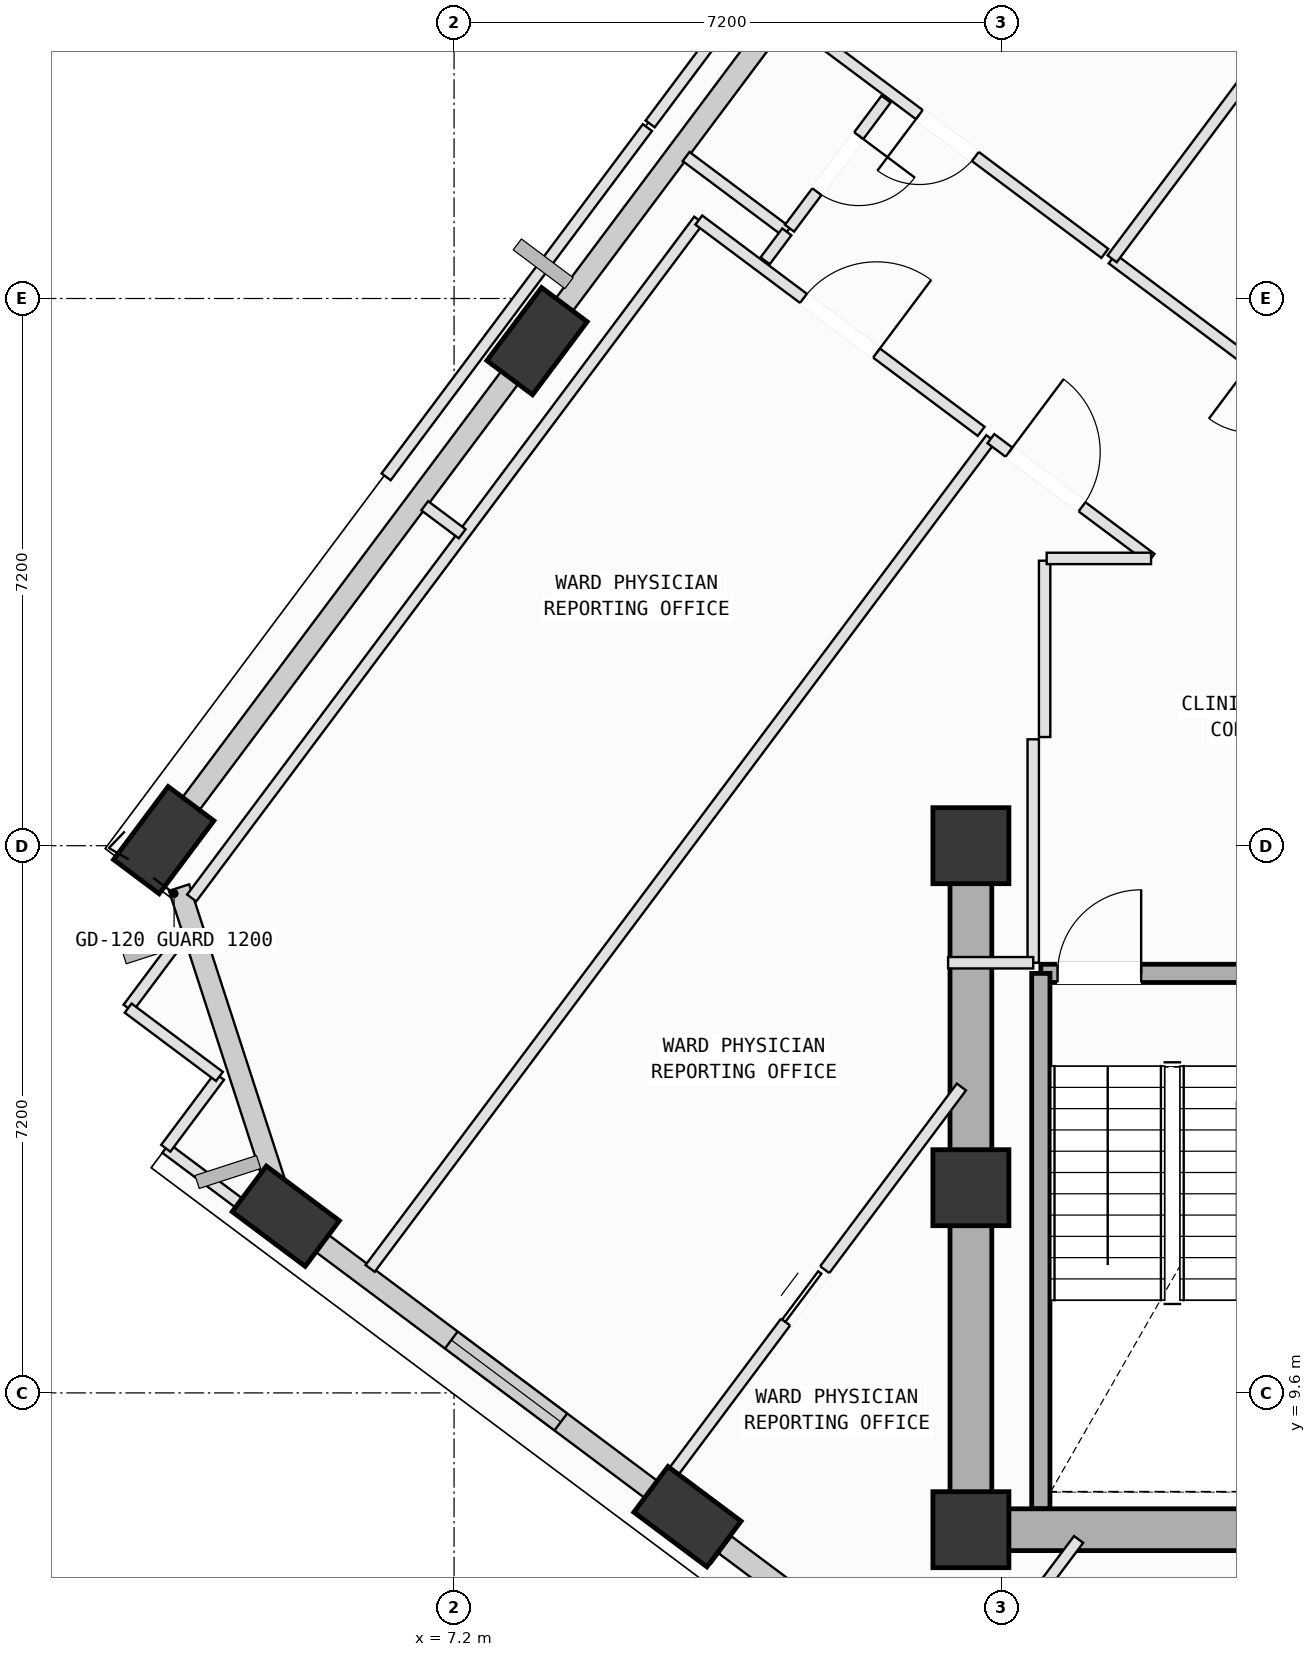
"""IFC4 building model, lengths in metres.
Left out: names, types, materials, properties, quantities, classifications, styles, units other than length and angle.
Written with IfcOpenShell. Run it as: python <this file> out.ifc"""

import sys

from ifc_helpers import new_model, si_unit, direction, frame, frame_2d, origin, origin_2d, place, context, subcontext, project, spatial, rectangle, extrude, element, fill, save


model = new_model("IFC4")
c1 = context("Model", 3, precision=1e-05, world=origin(), true_north=direction((0.0, 1.0)))
c2 = subcontext(c1, "Body", "Model", "MODEL_VIEW")
j1 = project(units=[si_unit("LENGTHUNIT", "METRE"), si_unit("PLANEANGLEUNIT", "RADIAN")], contexts=[c1])
p1 = place(None, origin())
s1 = spatial("IfcSite", under=j1, at=p1, CompositionType="ELEMENT")
p2 = place(p1, origin())
s2 = spatial("IfcBuilding", under=s1, at=p2, CompositionType="ELEMENT")
p3 = place(p2, frame((0.0, 0.0, 251.2)))
s3 = spatial("IfcBuildingStorey", under=s2, at=p3, CompositionType="ELEMENT", Elevation=251.2)
for number, where, z_axis, x_axis in (
    (1, (14.0, 7.8, 0.0), (0.0, 0.0, 1.0), (1.0, 0.0, 0.0)),
    (2, (14.0, 12.3, 0.0), (0.0, 0.0, 1.0), (1.0, 0.0, 0.0)),
    (3, (14.0, 16.8, 0.0), (0.0, 0.0, 1.0), (1.0, 0.0, 0.0)),
):
    element("IfcColumn", number, at=place(p3, frame(where, z_axis=z_axis, x_axis=x_axis)), inside=s3, PredefinedType="COLUMN", context=c2, shape_type="SweptSolid", body=[
        extrude(rectangle(XDim=1.0, YDim=1.0, at=origin_2d()), origin(), (0.0, 0.0, 1.0), 4.0),
    ])
p4 = place(p3, frame((8.292, 23.439, 0.002), z_axis=(0.006440188343, -0.104318899858, 0.994523047046), x_axis=(0.548815872699, 0.831743378243, 0.083690445228)))
e4 = element("IfcColumn", 4, at=p4, inside=s3, PredefinedType="COLUMN", context=c2, shape_type="SweptSolid", body=[
    extrude(rectangle(XDim=1.2, YDim=0.75, at=origin_2d()), origin(), (0.0, 0.0, 1.0), 4.018),
])
p5 = place(p3, frame((3.38, 16.873, 0.002), z_axis=(0.033624737354, -0.123957139866, 0.991717704044), x_axis=(0.370235702407, 0.92322736919, 0.102843324731)))
e5 = element("IfcColumn", 5, at=p5, inside=s3, PredefinedType="COLUMN", context=c2, shape_type="SweptSolid", body=[
    extrude(rectangle(XDim=1.2, YDim=0.75, at=origin_2d()), origin(), (0.0, 0.0, 1.0), 4.03),
])
p6 = place(p3, frame((4.986, 11.925, 0.002), z_axis=(0.053856553718, -0.117163751282, 0.991651212376), x_axis=(-0.975646086915, 0.205300135249, 0.077243559951)))
e6 = element("IfcColumn", 6, at=p6, inside=s3, PredefinedType="COLUMN", context=c2, shape_type="SweptSolid", body=[
    extrude(rectangle(XDim=1.2, YDim=0.75, at=origin_2d()), origin(), (0.0, 0.0, 1.0), 4.03),
])
p7 = place(p3, frame((10.271, 7.971, 0.002), z_axis=(0.070003274171, -0.09548106893, 0.992966720027), x_axis=(-0.997462411054, 0.006244621078, 0.07092068275)))
e7 = element("IfcColumn", 7, at=p7, inside=s3, PredefinedType="COLUMN", context=c2, shape_type="SweptSolid", body=[
    extrude(rectangle(XDim=1.2, YDim=0.75, at=origin_2d()), origin(), (0.0, 0.0, 1.0), 4.025),
])
p8 = place(p3, frame((8.419, 23.61, 0.0), z_axis=(0.0, 0.0, 1.0), x_axis=(0.599043256436, 0.800716664569, 0.0)))
e8 = element("IfcWall", 8, at=p8, inside=s3, PredefinedType="SOLIDWALL", context=c2, shape_type="SweptSolid", body=[
    extrude(rectangle(XDim=7.434, YDim=0.28, at=frame_2d((3.717, 0.0))), origin(), (0.0, 0.0, 1.0), 3.265),
])
p9 = place(p3, frame((3.489, 17.019, 0.0), z_axis=(0.0, 0.0, 1.0), x_axis=(0.59901836421, 0.800735286683, 0.0)))
e9 = element("IfcWall", 9, at=p9, inside=s3, PredefinedType="SOLIDWALL", context=c2, shape_type="SweptSolid", body=[
    extrude(rectangle(XDim=7.485, YDim=0.28, at=frame_2d((3.742, 0.0))), origin(), (0.0, 0.0, 1.0), 3.265),
])
p10 = place(p3, frame((4.943, 12.056, 0.0), z_axis=(0.0, 0.0, 1.0), x_axis=(-0.30872411245, 0.951151629548, 0.0)))
e10 = element("IfcWall", 10, at=p10, inside=s3, PredefinedType="SOLIDWALL", context=c2, shape_type="SweptSolid", body=[
    extrude(rectangle(XDim=4.408, YDim=0.28, at=frame_2d((2.204, 0.0))), origin(), (0.0, 0.0, 1.0), 3.265),
])
p11 = place(p3, frame((10.14, 8.069, 0.0), z_axis=(0.0, 0.0, 1.0), x_axis=(-0.800727991846, 0.599028115429, 0.0)))
e11 = element("IfcWall", 11, at=p11, inside=s3, PredefinedType="SOLIDWALL", context=c2, shape_type="SweptSolid", body=[
    extrude(rectangle(XDim=5.831, YDim=0.28, at=frame_2d((2.915, 0.0))), origin(), (0.0, 0.0, 1.0), 3.265),
])
p12 = place(p11, frame((1.917, 0.0, 0.75)))
e12 = element("IfcOpeningElement", 12, at=p12, cuts=e11, PredefinedType="OPENING", context=c2, shape_type="SweptSolid", body=[
    extrude(rectangle(XDim=1.8, YDim=2.05, at=frame_2d((0.9, 1.025))), frame((0.0, 0.15, 0.0), z_axis=(0.0, -1.0, 0.0), x_axis=(1.0, 0.0, 0.0)), (0.0, 0.0, 1.0), 0.3),
])
p13 = place(p3, frame((15.46, 4.09, 0.0), z_axis=(0.0, 0.0, 1.0), x_axis=(-0.800744184448, 0.599006469976, 0.0)))
e13 = element("IfcWall", 13, at=p13, inside=s3, PredefinedType="SOLIDWALL", context=c2, shape_type="SweptSolid", body=[
    extrude(rectangle(XDim=5.861, YDim=0.28, at=frame_2d((2.93, 0.0))), origin(), (0.0, 0.0, 1.0), 3.245),
])
p14 = place(p13, frame((3.604, 0.0, 0.75)))
e14 = element("IfcOpeningElement", 14, at=p14, cuts=e13, PredefinedType="OPENING", context=c2, shape_type="SweptSolid", body=[
    extrude(rectangle(XDim=1.2, YDim=1.75, at=frame_2d((0.6, 0.875))), frame((0.0, 0.15, 0.0), z_axis=(0.0, -1.0, 0.0), x_axis=(1.0, 0.0, 0.0)), (0.0, 0.0, 1.0), 0.3),
])
p15 = place(p3, frame((14.92, 15.12, 0.0), z_axis=(0.0, 0.0, 1.0), x_axis=(1.0, 0.0, 0.0)))
e15 = element("IfcWall", 15, at=p15, inside=s3, PredefinedType="SOLIDWALL", context=c2, shape_type="SweptSolid", body=[
    extrude(rectangle(XDim=3.46, YDim=0.24, at=frame_2d((1.73, 0.0))), origin(), (0.0, 0.0, 1.0), 3.78),
])
p16 = place(p15, frame((0.22, 0.0, 0.0)))
e16 = element("IfcOpeningElement", 16, at=p16, cuts=e15, PredefinedType="OPENING", context=c2, shape_type="SweptSolid", body=[
    extrude(rectangle(XDim=1.1, YDim=2.15, at=frame_2d((0.55, 1.075))), frame((0.0, 0.13, 0.0), z_axis=(0.0, -1.0, 0.0), x_axis=(1.0, 0.0, 0.0)), (0.0, 0.0, 1.0), 0.26),
])
p17 = place(p3, frame((14.92, 8.075, 0.0), z_axis=(0.0, 0.0, 1.0), x_axis=(0.0, 1.0, 0.0)))
e17 = element("IfcWall", 17, at=p17, inside=s3, PredefinedType="SOLIDWALL", context=c2, shape_type="SweptSolid", body=[
    extrude(rectangle(XDim=7.045, YDim=0.24, at=frame_2d((3.522, 0.0))), origin(), (0.0, 0.0, 1.0), 3.78),
])
p18 = place(p3, frame((14.0, 7.8, 0.0), z_axis=(0.0, 0.0, 1.0), x_axis=(1.0, 0.0, 0.0)))
e18 = element("IfcWall", 18, at=p18, inside=s3, PredefinedType="SHEAR", context=c2, shape_type="SweptSolid", body=[
    extrude(rectangle(XDim=10.8, YDim=0.55, at=frame_2d((5.4, 0.0))), origin(), (0.0, 0.0, 1.0), 3.78),
])
p19 = place(p3, frame((14.0, 16.8, 0.0), z_axis=(0.0, 0.0, 1.0), x_axis=(0.0, -1.0, 0.0)))
e19 = element("IfcWall", 19, at=p19, inside=s3, PredefinedType="SHEAR", context=c2, shape_type="SweptSolid", body=[
    extrude(rectangle(XDim=9.0, YDim=0.55, at=frame_2d((4.5, 0.0))), origin(), (0.0, 0.0, 1.0), 3.78),
])
p20 = place(p3, frame((13.782, 5.488, 0.0), z_axis=(0.0, 0.0, 1.0), x_axis=(0.599283876388, 0.800536592231, 0.0)))
e20 = element("IfcWall", 20, at=p20, inside=s3, PredefinedType="PARTITIONING", context=c2, shape_type="SweptSolid", body=[
    extrude(rectangle(XDim=2.728, YDim=0.15, at=frame_2d((1.364, 0.0))), origin(), (0.0, 0.0, 1.0), 3.78),
])
p21 = place(p20, frame((0.302, 0.0, 0.0)))
e21 = element("IfcOpeningElement", 21, at=p21, cuts=e20, PredefinedType="OPENING", context=c2, shape_type="SweptSolid", body=[
    extrude(rectangle(XDim=0.86, YDim=2.06, at=frame_2d((0.43, 1.03))), frame((0.0, 0.085, 0.0), z_axis=(0.0, -1.0, 0.0), x_axis=(1.0, 0.0, 0.0)), (0.0, 0.0, 1.0), 0.17),
])
p22 = place(p3, frame((10.629, 7.416, 0.0), z_axis=(0.0, 0.0, 1.0), x_axis=(-0.8007477401, 0.599001716796, 0.0)))
e22 = element("IfcWall", 22, at=p22, inside=s3, PredefinedType="PARTITIONING", context=c2, shape_type="SweptSolid", body=[
    extrude(rectangle(XDim=0.783, YDim=0.15, at=frame_2d((0.392, 0.0))), origin(), (0.0, 0.0, 1.0), 3.245),
])
p23 = place(p3, frame((9.939, 8.363, 0.0), z_axis=(0.0, 0.0, 1.0), x_axis=(0.598983005593, 0.80076173673, 0.0)))
e23 = element("IfcWall", 23, at=p23, inside=s3, PredefinedType="PARTITIONING", context=c2, shape_type="SweptSolid", body=[
    extrude(rectangle(XDim=6.571, YDim=0.15, at=frame_2d((3.286, 0.0))), origin(), (0.0, 0.0, 1.0), 3.78),
])
p24 = place(p23, frame((2.709, 0.0, 0.0)))
e24 = element("IfcOpeningElement", 24, at=p24, cuts=e23, PredefinedType="OPENING", context=c2, shape_type="SweptSolid", body=[
    extrude(rectangle(XDim=0.86, YDim=2.06, at=frame_2d((0.43, 1.03))), frame((0.0, 0.085, 0.0), z_axis=(0.0, -1.0, 0.0), x_axis=(1.0, 0.0, 0.0)), (0.0, 0.0, 1.0), 0.17),
])
p25 = place(p3, frame((14.97, 20.55, 0.0), z_axis=(0.0, 0.0, 1.0), x_axis=(0.0, -1.0, 0.0)))
e25 = element("IfcWall", 25, at=p25, inside=s3, PredefinedType="PARTITIONING", context=c2, shape_type="SweptSolid", body=[
    extrude(rectangle(XDim=2.32, YDim=0.15, at=frame_2d((1.16, 0.0))), origin(), (0.0, 0.0, 1.0), 3.78),
])
p26 = place(p3, frame((14.82, 18.2, 0.0), z_axis=(0.0, 0.0, 1.0), x_axis=(0.0, -1.0, 0.0)))
e26 = element("IfcWall", 26, at=p26, inside=s3, PredefinedType="PARTITIONING", context=c2, shape_type="SweptSolid", body=[
    extrude(rectangle(XDim=2.94, YDim=0.15, at=frame_2d((1.47, 0.0))), origin(), (0.0, 0.0, 1.0), 3.78),
])
p27 = place(p3, frame((14.82, 15.26, 0.0), z_axis=(0.0, 0.0, 1.0), x_axis=(-1.0, 0.0, 0.0)))
e27 = element("IfcWall", 27, at=p27, inside=s3, PredefinedType="PARTITIONING", context=c2, shape_type="SweptSolid", body=[
    extrude(rectangle(XDim=1.12, YDim=0.15, at=frame_2d((0.56, 0.0))), origin(), (0.0, 0.0, 1.0), 3.78),
])
p28 = place(p3, frame((6.096, 11.238, 0.0), z_axis=(0.0, 0.0, 1.0), x_axis=(0.598991058124, 0.80075571324, 0.0)))
e28 = element("IfcWall", 28, at=p28, inside=s3, PredefinedType="PARTITIONING", context=c2, shape_type="SweptSolid", body=[
    extrude(rectangle(XDim=13.635, YDim=0.15, at=frame_2d((6.817, 0.0))), origin(), (0.0, 0.0, 1.0), 3.78),
])
p29 = place(p3, frame((14.263, 22.156, 0.0), z_axis=(0.0, 0.0, 1.0), x_axis=(0.800812047069, -0.598915741377, 0.0)))
e29 = element("IfcWall", 29, at=p29, inside=s3, PredefinedType="PARTITIONING", context=c2, shape_type="SweptSolid", body=[
    extrude(rectangle(XDim=2.631, YDim=0.15, at=frame_2d((1.316, 0.0))), origin(), (0.0, 0.0, 1.0), 3.78),
])
p30 = place(p29, frame((0.297, 0.0, 0.0)))
e30 = element("IfcOpeningElement", 30, at=p30, cuts=e29, PredefinedType="OPENING", context=c2, shape_type="SweptSolid", body=[
    extrude(rectangle(XDim=1.2, YDim=2.15, at=frame_2d((0.6, 1.075))), frame((0.0, 0.085, 0.0), z_axis=(0.0, -1.0, 0.0), x_axis=(1.0, 0.0, 0.0)), (0.0, 0.0, 1.0), 0.17),
])
p31 = place(p3, frame((16.37, 20.58, 0.0), z_axis=(0.0, 0.0, 1.0), x_axis=(-1.0, 0.0, 0.0)))
e31 = element("IfcWall", 31, at=p31, inside=s3, PredefinedType="PARTITIONING", context=c2, shape_type="SweptSolid", body=[
    extrude(rectangle(XDim=1.373, YDim=0.15, at=frame_2d((0.687, 0.0))), origin(), (0.0, 0.0, 1.0), 3.78),
])
p32 = place(p3, frame((2.912, 14.663, 0.0), z_axis=(0.0, 0.0, 1.0), x_axis=(0.598958853105, 0.800779802622, 0.0)))
e32 = element("IfcWall", 32, at=p32, inside=s3, PredefinedType="PARTITIONING", context=c2, shape_type="SweptSolid", body=[
    extrude(rectangle(XDim=1.239, YDim=0.15, at=frame_2d((0.619, 0.0))), origin(), (0.0, 0.0, 1.0), 3.78),
])
p33 = place(p3, frame((3.748, 16.112, 0.0), z_axis=(0.0, 0.0, 1.0), x_axis=(0.598961482062, 0.800777836235, 0.0)))
e33 = element("IfcWall", 33, at=p33, inside=s3, PredefinedType="PARTITIONING", context=c2, shape_type="SweptSolid", body=[
    extrude(rectangle(XDim=11.139, YDim=0.15, at=frame_2d((5.57, 0.0))), origin(), (0.0, 0.0, 1.0), 3.265),
])
p34 = place(p3, frame((10.42, 25.032, 0.0), z_axis=(0.0, 0.0, 1.0), x_axis=(0.800649857495, -0.599132544345, 0.0)))
e34 = element("IfcWall", 34, at=p34, inside=s3, PredefinedType="PARTITIONING", context=c2, shape_type="SweptSolid", body=[
    extrude(rectangle(XDim=4.64, YDim=0.15, at=frame_2d((2.32, 0.0))), origin(), (0.0, 0.0, 1.0), 3.78),
])
p35 = place(p34, frame((1.72, 0.0, 0.0)))
e35 = element("IfcOpeningElement", 35, at=p35, cuts=e34, PredefinedType="OPENING", context=c2, shape_type="SweptSolid", body=[
    extrude(rectangle(XDim=1.2, YDim=2.15, at=frame_2d((0.6, 1.075))), frame((0.0, 0.085, 0.0), z_axis=(0.0, -1.0, 0.0), x_axis=(1.0, 0.0, 0.0)), (0.0, 0.0, 1.0), 0.17),
])
p36 = place(p3, frame((5.333, 11.378, 0.0), z_axis=(0.0, 0.0, 1.0), x_axis=(-0.800669347781, 0.599106497648, 0.0)))
e36 = element("IfcWall", 36, at=p36, inside=s3, PredefinedType="PARTITIONING", context=c2, shape_type="SweptSolid", body=[
    extrude(rectangle(XDim=2.406, YDim=0.15, at=frame_2d((1.203, 0.0))), origin(), (0.0, 0.0, 1.0), 3.265),
])
p37 = place(p3, frame((3.407, 12.819, 0.0), z_axis=(0.0, 0.0, 1.0), x_axis=(0.598608136415, 0.801042008273, 0.0)))
e37 = element("IfcWall", 37, at=p37, inside=s3, PredefinedType="PARTITIONING", context=c2, shape_type="SweptSolid", body=[
    extrude(rectangle(XDim=1.179, YDim=0.15, at=frame_2d((0.59, 0.0))), origin(), (0.0, 0.0, 1.0), 3.78),
])
p38 = place(p3, frame((4.113, 13.764, 0.0), z_axis=(0.0, 0.0, 1.0), x_axis=(-0.800487936805, 0.599348865878, 0.0)))
e38 = element("IfcWall", 38, at=p38, inside=s3, PredefinedType="PARTITIONING", context=c2, shape_type="SweptSolid", body=[
    extrude(rectangle(XDim=1.5, YDim=0.15, at=frame_2d((0.75, 0.0))), origin(), (0.0, 0.0, 1.0), 3.78),
])
p39 = place(p3, frame((20.246, 21.24, 0.0), z_axis=(0.0, 0.0, 1.0), x_axis=(-0.800801245032, 0.598930184542, 0.0)))
e39 = element("IfcWall", 39, at=p39, inside=s3, PredefinedType="PARTITIONING", context=c2, shape_type="SweptSolid", body=[
    extrude(rectangle(XDim=5.48, YDim=0.15, at=frame_2d((2.74, 0.0))), origin(), (0.0, 0.0, 1.0), 3.415),
])
p40 = place(p39, frame((2.28, 0.0, 0.0)))
e40 = element("IfcOpeningElement", 40, at=p40, cuts=e39, PredefinedType="OPENING", context=c2, shape_type="SweptSolid", body=[
    extrude(rectangle(XDim=0.92, YDim=2.1, at=frame_2d((0.46, 1.05))), frame((0.0, 0.085, 0.0), z_axis=(0.0, -1.0, 0.0), x_axis=(1.0, 0.0, 0.0)), (0.0, 0.0, 1.0), 0.17),
])
p41 = place(p3, frame((15.858, 24.522, 0.0), z_axis=(0.0, 0.0, 1.0), x_axis=(0.599126091741, 0.800654685989, 0.0)))
e41 = element("IfcWall", 41, at=p41, inside=s3, PredefinedType="PARTITIONING", context=c2, shape_type="SweptSolid", body=[
    extrude(rectangle(XDim=4.069, YDim=0.15, at=frame_2d((2.035, 0.0))), origin(), (0.0, 0.0, 1.0), 3.78),
])
p42 = place(p3, frame((15.762, 24.594, 0.0), z_axis=(0.0, 0.0, 1.0), x_axis=(-0.800735316179, 0.599018324781, 0.0)))
e42 = element("IfcWall", 42, at=p42, inside=s3, PredefinedType="PARTITIONING", context=c2, shape_type="SweptSolid", body=[
    extrude(rectangle(XDim=5.175, YDim=0.15, at=frame_2d((2.588, 0.0))), origin(), (0.0, 0.0, 1.0), 3.78),
])
p43 = place(p42, frame((2.128, 0.0, 0.0)))
e43 = element("IfcOpeningElement", 43, at=p43, cuts=e42, PredefinedType="OPENING", context=c2, shape_type="SweptSolid", body=[
    extrude(rectangle(XDim=0.92, YDim=2.1, at=frame_2d((0.46, 1.05))), frame((0.0, 0.085, 0.0), z_axis=(0.0, -1.0, 0.0), x_axis=(1.0, 0.0, 0.0)), (0.0, 0.0, 1.0), 0.17),
])
p44 = place(p3, frame((7.307, 20.904, 0.0), z_axis=(0.0, 0.0, 1.0), x_axis=(-0.800618180237, 0.599174873867, 0.0)))
e44 = element("IfcWall", 44, at=p44, inside=s3, PredefinedType="PARTITIONING", context=c2, shape_type="SweptSolid", body=[
    extrude(rectangle(XDim=0.616, YDim=0.15, at=frame_2d((0.308, 0.0))), origin(), (0.0, 0.0, 1.0), 3.78),
])
p45 = place(p3, frame((6.306, 21.653, 0.0), z_axis=(0.0, 0.0, 1.0), x_axis=(0.598999072207, 0.800749718386, 0.0)))
e45 = element("IfcWall", 45, at=p45, inside=s3, PredefinedType="PARTITIONING", context=c2, shape_type="SweptSolid", body=[
    extrude(rectangle(XDim=5.74, YDim=0.15, at=frame_2d((2.87, 0.0))), origin(), (0.0, 0.0, 1.0), 3.78),
])
p46 = place(p3, frame((10.253, 25.868, 0.0), z_axis=(0.0, 0.0, 1.0), x_axis=(0.800796106591, -0.598937054847, 0.0)))
e46 = element("IfcWall", 46, at=p46, inside=s3, PredefinedType="PARTITIONING", context=c2, shape_type="SweptSolid", body=[
    extrude(rectangle(XDim=1.655, YDim=0.15, at=frame_2d((0.827, 0.0))), origin(), (0.0, 0.0, 1.0), 3.78),
])
p47 = place(p3, frame((11.578, 24.877, 0.0), z_axis=(0.0, 0.0, 1.0), x_axis=(-0.59901402037, -0.800738536228, 0.0)))
e47 = element("IfcWall", 47, at=p47, inside=s3, PredefinedType="PARTITIONING", context=c2, shape_type="SweptSolid", body=[
    extrude(rectangle(XDim=0.476, YDim=0.15, at=frame_2d((0.238, 0.0))), origin(), (0.0, 0.0, 1.0), 3.78),
])
p48 = place(p3, frame((12.884, 26.623, 0.0), z_axis=(0.0, 0.0, 1.0), x_axis=(-0.598949421872, -0.800786856809, 0.0)))
e48 = element("IfcWall", 48, at=p48, inside=s3, PredefinedType="PARTITIONING", context=c2, shape_type="SweptSolid", body=[
    extrude(rectangle(XDim=2.12, YDim=0.15, at=frame_2d((1.06, 0.0))), origin(), (0.0, 0.0, 1.0), 3.78),
])
p49 = place(p48, frame((0.6, 0.0, 0.0)))
e49 = element("IfcOpeningElement", 49, at=p49, cuts=e48, PredefinedType="OPENING", context=c2, shape_type="SweptSolid", body=[
    extrude(rectangle(XDim=0.92, YDim=2.1, at=frame_2d((0.46, 1.05))), frame((0.0, 0.085, 0.0), z_axis=(0.0, -1.0, 0.0), x_axis=(1.0, 0.0, 0.0)), (0.0, 0.0, 1.0), 0.17),
])
p50 = place(p3, frame((9.78, 26.297, 0.0), z_axis=(0.0, 0.0, 1.0), x_axis=(0.599073900283, 0.800693737955, 0.0)))
e50 = element("IfcWall", 50, at=p50, inside=s3, PredefinedType="PARTITIONING", context=c2, shape_type="SweptSolid", body=[
    extrude(rectangle(XDim=5.57, YDim=0.15, at=frame_2d((2.785, 0.0))), origin(), (0.0, 0.0, 1.0), 3.78),
])
p51 = place(p12, origin())
e51 = element("IfcWindow", 51, at=p51, inside=s3, PartitioningType="SINGLE_PANEL", PredefinedType="WINDOW", context=c2, shape_type="SweptSolid", body=[
    extrude(rectangle(XDim=1.8, YDim=2.05, at=frame_2d((0.9, 1.025))), frame((0.0, 0.03, 0.0), z_axis=(0.0, -1.0, 0.0), x_axis=(1.0, 0.0, 0.0)), (0.0, 0.0, 1.0), 0.06),
])
fill(e12, e51)
p52 = place(p16, origin())
e52 = element("IfcDoor", 52, at=p52, inside=s3, OperationType="SINGLE_SWING_RIGHT", PredefinedType="DOOR", context=c2, shape_type="SweptSolid", body=[
    extrude(rectangle(XDim=1.1, YDim=2.15, at=frame_2d((0.55, 1.075))), frame((0.0, 0.025, 0.0), z_axis=(0.0, -1.0, 0.0), x_axis=(1.0, 0.0, 0.0)), (0.0, 0.0, 1.0), 0.05),
])
fill(e16, e52)
p53 = place(p30, origin())
e53 = element("IfcDoor", 53, at=p53, inside=s3, OperationType="SINGLE_SWING_LEFT", PredefinedType="DOOR", context=c2, shape_type="SweptSolid", body=[
    extrude(rectangle(XDim=1.2, YDim=2.15, at=frame_2d((0.6, 1.075))), frame((0.0, 0.025, 0.0), z_axis=(0.0, -1.0, 0.0), x_axis=(1.0, 0.0, 0.0)), (0.0, 0.0, 1.0), 0.05),
])
fill(e30, e53)
p54 = place(p35, origin())
e54 = element("IfcDoor", 54, at=p54, inside=s3, OperationType="SINGLE_SWING_RIGHT", PredefinedType="DOOR", context=c2, shape_type="SweptSolid", body=[
    extrude(rectangle(XDim=1.2, YDim=2.15, at=frame_2d((0.6, 1.075))), frame((0.0, 0.025, 0.0), z_axis=(0.0, -1.0, 0.0), x_axis=(1.0, 0.0, 0.0)), (0.0, 0.0, 1.0), 0.05),
])
fill(e35, e54)
p55 = place(p43, origin())
e55 = element("IfcDoor", 55, at=p55, inside=s3, OperationType="SINGLE_SWING_RIGHT", PredefinedType="DOOR", context=c2, shape_type="SweptSolid", body=[
    extrude(rectangle(XDim=0.92, YDim=2.1, at=frame_2d((0.46, 1.05))), frame((0.0, 0.025, 0.0), z_axis=(0.0, -1.0, 0.0), x_axis=(1.0, 0.0, 0.0)), (0.0, 0.0, 1.0), 0.05),
])
fill(e43, e55)
p56 = place(p49, origin())
e56 = element("IfcDoor", 56, at=p56, inside=s3, OperationType="SINGLE_SWING_LEFT", PredefinedType="DOOR", context=c2, shape_type="SweptSolid", body=[
    extrude(rectangle(XDim=0.92, YDim=2.1, at=frame_2d((0.46, 1.05))), frame((0.0, 0.025, 0.0), z_axis=(0.0, -1.0, 0.0), x_axis=(1.0, 0.0, 0.0)), (0.0, 0.0, 1.0), 0.05),
])
fill(e49, e56)
p57 = place(p24, origin())
e57 = element("IfcDoor", 57, at=p57, inside=s3, OperationType="SLIDING_TO_LEFT", PredefinedType="DOOR", context=c2, shape_type="SweptSolid", body=[
    extrude(rectangle(XDim=0.86, YDim=2.06, at=frame_2d((0.43, 1.03))), frame((0.0, 0.025, 0.0), z_axis=(0.0, -1.0, 0.0), x_axis=(1.0, 0.0, 0.0)), (0.0, 0.0, 1.0), 0.05),
])
fill(e24, e57)
save(model, sys.argv[1])
